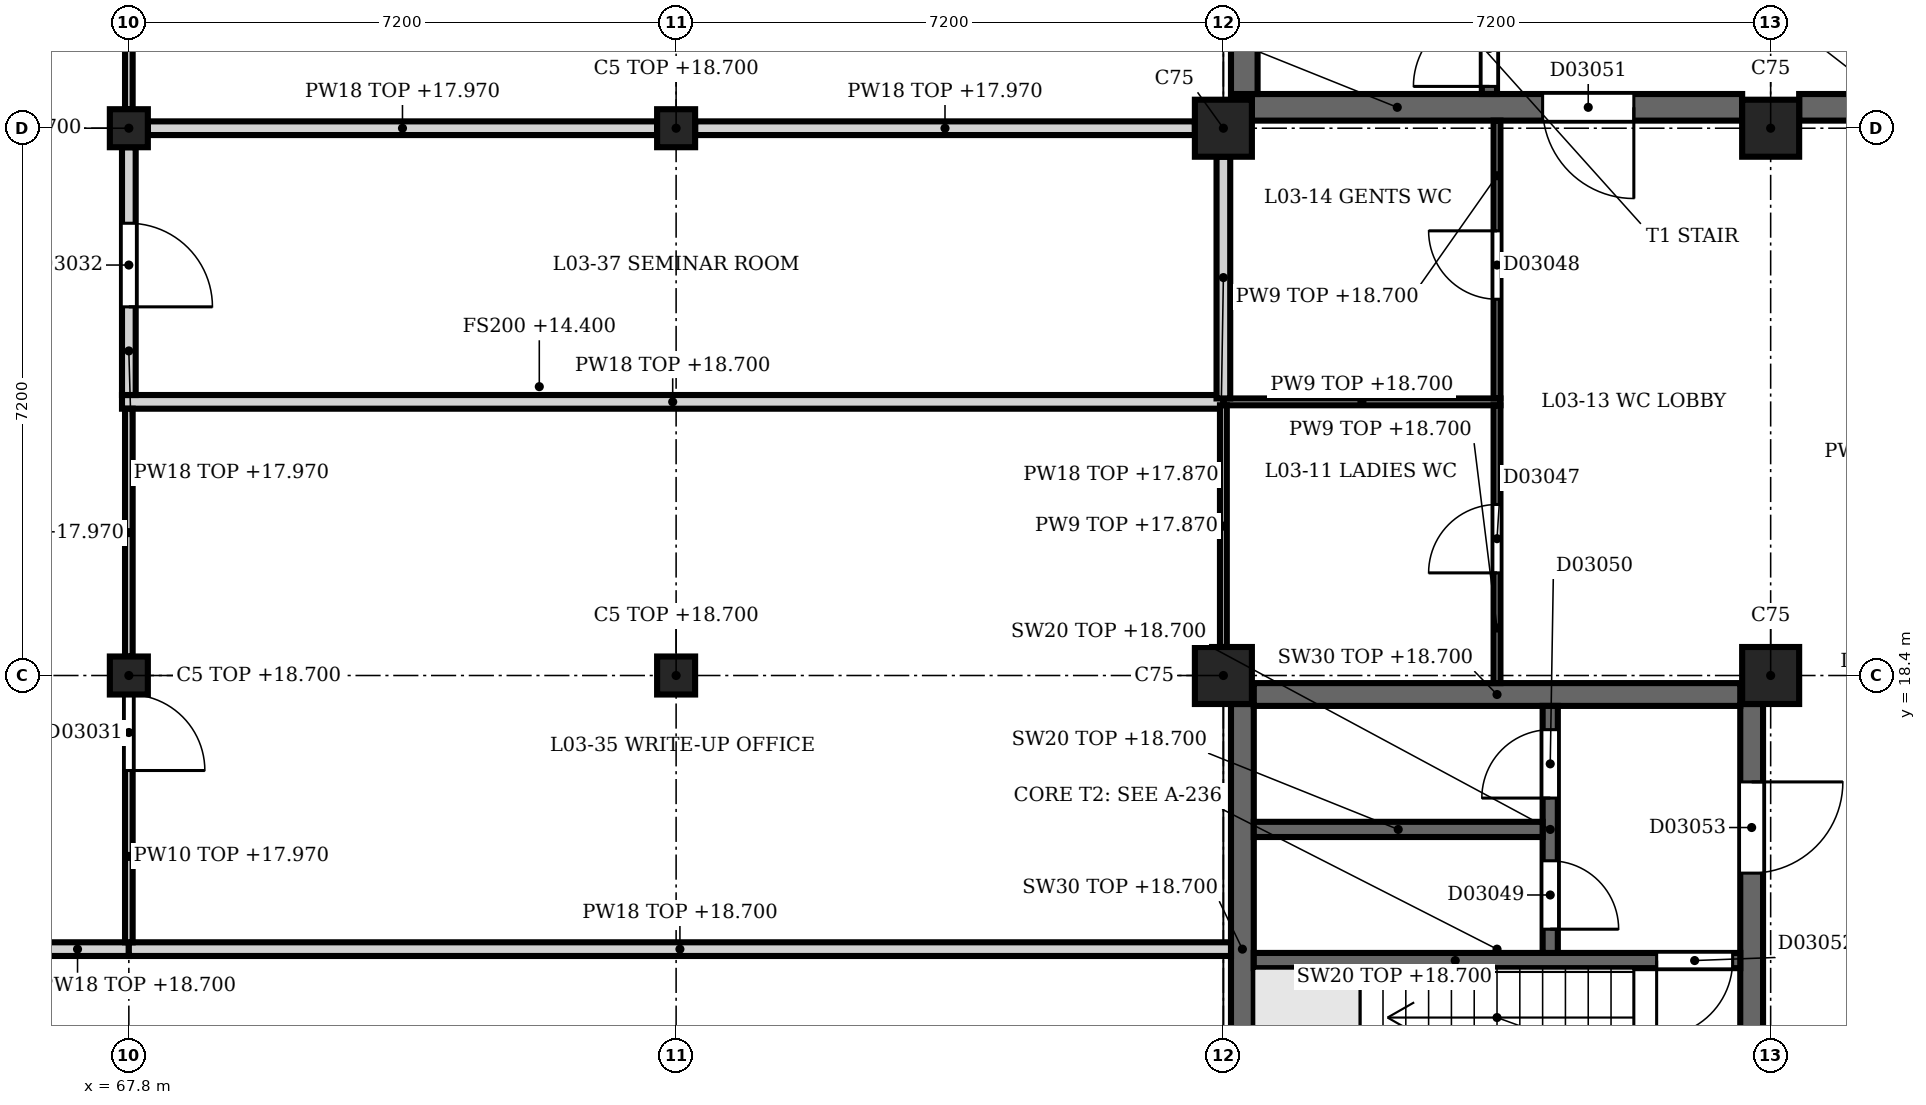
"""IFC4 building model, lengths in metres.
Left out: names, types, materials, properties, quantities, classifications, styles, units other than length and angle.
Written with IfcOpenShell. Run it as: python <this file> out.ifc"""

import sys

from ifc_helpers import new_model, si_unit, direction, frame, frame_2d, origin, origin_2d, place, context, subcontext, project, spatial, rectangle, extrude, element, fill, save


model = new_model("IFC4")
c1 = context("Model", 3, precision=1e-05, world=origin(), true_north=direction((0.0, 1.0)))
c2 = subcontext(c1, "Body", "Model", "MODEL_VIEW")
j1 = project(units=[si_unit("LENGTHUNIT", "METRE"), si_unit("PLANEANGLEUNIT", "RADIAN")], contexts=[c1])
p1 = place(None, origin())
s1 = spatial("IfcSite", under=j1, at=p1, CompositionType="ELEMENT")
p2 = place(p1, origin())
s2 = spatial("IfcBuilding", under=s1, at=p2, CompositionType="ELEMENT")
p3 = place(p2, frame((0.0, 0.0, 14.4)))
s3 = spatial("IfcBuildingStorey", under=s2, at=p3, CompositionType="ELEMENT", Elevation=14.4)
for number, where, z_axis, x_axis in (
    (1, (82.2, 18.4, 0.0), (0.0, 0.0, 1.0), (1.0, 0.0, 0.0)),
    (2, (82.2, 25.6, 0.0), (0.0, 0.0, 1.0), (1.0, 0.0, 0.0)),
    (3, (89.4, 18.4, 0.0), (0.0, 0.0, 1.0), (1.0, 0.0, 0.0)),
    (4, (89.4, 25.6, 0.0), (0.0, 0.0, 1.0), (1.0, 0.0, 0.0)),
):
    element("IfcColumn", number, at=place(p3, frame(where, z_axis=z_axis, x_axis=x_axis)), inside=s3, PredefinedType="COLUMN", context=c2, shape_type="SweptSolid", body=[
        extrude(rectangle(XDim=0.75, YDim=0.75, at=origin_2d()), origin(), (0.0, 0.0, 1.0), 4.5),
    ])
for number, where, z_axis, x_axis in (
    (5, (67.8, 18.4, 0.0), (0.0, 0.0, 1.0), (1.0, 0.0, 0.0)),
    (6, (67.8, 25.6, 0.0), (0.0, 0.0, 1.0), (1.0, 0.0, 0.0)),
    (7, (75.0, 18.4, 0.0), (0.0, 0.0, 1.0), (1.0, 0.0, 0.0)),
    (8, (75.0, 25.6, 0.0), (0.0, 0.0, 1.0), (1.0, 0.0, 0.0)),
):
    element("IfcColumn", number, at=place(p3, frame(where, z_axis=z_axis, x_axis=x_axis)), inside=s3, PredefinedType="COLUMN", context=c2, shape_type="SweptSolid", body=[
        extrude(rectangle(XDim=0.5, YDim=0.5, at=origin_2d()), origin(), (0.0, 0.0, 1.0), 4.3),
    ])
p4 = place(p3, frame((82.575, 25.875, 0.0), z_axis=(0.0, 0.0, 1.0), x_axis=(1.0, 0.0, 0.0)))
e9 = element("IfcWall", 9, at=p4, inside=s3, PredefinedType="SHEAR", context=c2, shape_type="SweptSolid", body=[
    extrude(rectangle(XDim=6.45, YDim=0.35, at=frame_2d((3.225, 0.0))), origin(), (0.0, 0.0, 1.0), 4.3),
])
p5 = place(p4, frame((3.825, 0.0, 0.0)))
e10 = element("IfcOpeningElement", 10, at=p5, cuts=e9, PredefinedType="OPENING", context=c2, shape_type="SweptSolid", body=[
    extrude(rectangle(XDim=1.2, YDim=2.1, at=frame_2d((0.6, 1.05))), frame((0.0, 0.185, 0.0), z_axis=(0.0, -1.0, 0.0), x_axis=(1.0, 0.0, 0.0)), (0.0, 0.0, 1.0), 0.37),
])
p6 = place(p3, frame((89.775, 25.875, 0.0), z_axis=(0.0, 0.0, 1.0), x_axis=(1.0, 0.0, 0.0)))
e11 = element("IfcWall", 11, at=p6, inside=s3, PredefinedType="SHEAR", context=c2, shape_type="SweptSolid", body=[
    extrude(rectangle(XDim=6.45, YDim=0.35, at=frame_2d((3.225, 0.0))), origin(), (0.0, 0.0, 1.0), 4.3),
])
p7 = place(p6, frame((2.625, 0.0, 0.0)))
e12 = element("IfcOpeningElement", 12, at=p7, cuts=e11, PredefinedType="OPENING", context=c2, shape_type="SweptSolid", body=[
    extrude(rectangle(XDim=1.8, YDim=2.1, at=frame_2d((0.9, 1.05))), frame((0.0, 0.185, 0.0), z_axis=(0.0, -1.0, 0.0), x_axis=(1.0, 0.0, 0.0)), (0.0, 0.0, 1.0), 0.37),
])
p8 = place(p3, frame((82.475, 26.05, 0.0), z_axis=(0.0, 0.0, 1.0), x_axis=(0.0, 1.0, 0.0)))
e13 = element("IfcWall", 13, at=p8, inside=s3, PredefinedType="SHEAR", context=c2, shape_type="SweptSolid", body=[
    extrude(rectangle(XDim=6.3, YDim=0.35, at=frame_2d((3.15, 0.0))), origin(), (0.0, 0.0, 1.0), 4.3),
])
p9 = place(p3, frame((85.7, 26.05, 0.0), z_axis=(0.0, 0.0, 1.0), x_axis=(0.0, 1.0, 0.0)))
e14 = element("IfcWall", 14, at=p9, inside=s3, PredefinedType="SHEAR", context=c2, shape_type="SweptSolid", body=[
    extrude(rectangle(XDim=6.3, YDim=0.2, at=frame_2d((3.15, 0.0))), origin(), (0.0, 0.0, 1.0), 4.3),
])
p10 = place(p9, frame((0.1, 0.0, 0.0)))
e15 = element("IfcOpeningElement", 15, at=p10, cuts=e14, PredefinedType="OPENING", context=c2, shape_type="SweptSolid", body=[
    extrude(rectangle(XDim=1.0, YDim=2.1, at=frame_2d((0.5, 1.05))), frame((0.0, 0.11, 0.0), z_axis=(0.0, -1.0, 0.0), x_axis=(1.0, 0.0, 0.0)), (0.0, 0.0, 1.0), 0.22),
])
p11 = place(p3, frame((89.15, 11.575, 0.0), z_axis=(0.0, 0.0, 1.0), x_axis=(0.0, 1.0, 0.0)))
e16 = element("IfcWall", 16, at=p11, inside=s3, PredefinedType="SHEAR", context=c2, shape_type="SweptSolid", body=[
    extrude(rectangle(XDim=6.45, YDim=0.3, at=frame_2d((3.225, 0.0))), origin(), (0.0, 0.0, 1.0), 4.3),
])
p12 = place(p11, frame((4.225, 0.0, 0.0)))
e17 = element("IfcOpeningElement", 17, at=p12, cuts=e16, PredefinedType="OPENING", context=c2, shape_type="SweptSolid", body=[
    extrude(rectangle(XDim=1.2, YDim=2.1, at=frame_2d((0.6, 1.05))), frame((0.0, 0.16, 0.0), z_axis=(0.0, -1.0, 0.0), x_axis=(1.0, 0.0, 0.0)), (0.0, 0.0, 1.0), 0.32),
])
p13 = place(p3, frame((82.45, 11.575, 0.0), z_axis=(0.0, 0.0, 1.0), x_axis=(0.0, 1.0, 0.0)))
e18 = element("IfcWall", 18, at=p13, inside=s3, PredefinedType="SHEAR", context=c2, shape_type="SweptSolid", body=[
    extrude(rectangle(XDim=6.45, YDim=0.3, at=frame_2d((3.225, 0.0))), origin(), (0.0, 0.0, 1.0), 4.3),
])
p14 = place(p3, frame((82.6, 18.15, 0.0), z_axis=(0.0, 0.0, 1.0), x_axis=(1.0, 0.0, 0.0)))
e19 = element("IfcWall", 19, at=p14, inside=s3, PredefinedType="SHEAR", context=c2, shape_type="SweptSolid", body=[
    extrude(rectangle(XDim=6.4, YDim=0.3, at=frame_2d((3.2, 0.0))), origin(), (0.0, 0.0, 1.0), 4.3),
])
p15 = place(p3, frame((89.0, 14.65, 0.0), z_axis=(0.0, 0.0, 1.0), x_axis=(-1.0, 0.0, 0.0)))
e20 = element("IfcWall", 20, at=p15, inside=s3, PredefinedType="SHEAR", context=c2, shape_type="SweptSolid", body=[
    extrude(rectangle(XDim=6.4, YDim=0.2, at=frame_2d((3.2, 0.0))), origin(), (0.0, 0.0, 1.0), 4.3),
])
p16 = place(p15, frame((0.1, 0.0, 0.0)))
e21 = element("IfcOpeningElement", 21, at=p16, cuts=e20, PredefinedType="OPENING", context=c2, shape_type="SweptSolid", body=[
    extrude(rectangle(XDim=1.0, YDim=2.1, at=frame_2d((0.5, 1.05))), frame((0.0, 0.11, 0.0), z_axis=(0.0, -1.0, 0.0), x_axis=(1.0, 0.0, 0.0)), (0.0, 0.0, 1.0), 0.22),
])
p17 = place(p3, frame((86.5, 18.0, 0.0), z_axis=(0.0, 0.0, 1.0), x_axis=(0.0, -1.0, 0.0)))
e22 = element("IfcWall", 22, at=p17, inside=s3, PredefinedType="SHEAR", context=c2, shape_type="SweptSolid", body=[
    extrude(rectangle(XDim=3.25, YDim=0.2, at=frame_2d((1.625, 0.0))), origin(), (0.0, 0.0, 1.0), 4.3),
])
p18 = place(p17, frame((2.038, 0.0, 0.0)))
e23 = element("IfcOpeningElement", 23, at=p18, cuts=e22, PredefinedType="OPENING", context=c2, shape_type="SweptSolid", body=[
    extrude(rectangle(XDim=0.9, YDim=2.1, at=frame_2d((0.45, 1.05))), frame((0.0, 0.11, 0.0), z_axis=(0.0, -1.0, 0.0), x_axis=(1.0, 0.0, 0.0)), (0.0, 0.0, 1.0), 0.22),
])
p19 = place(p17, frame((0.312, 0.0, 0.0)))
e24 = element("IfcOpeningElement", 24, at=p19, cuts=e22, PredefinedType="OPENING", context=c2, shape_type="SweptSolid", body=[
    extrude(rectangle(XDim=0.9, YDim=2.1, at=frame_2d((0.45, 1.05))), frame((0.0, 0.11, 0.0), z_axis=(0.0, -1.0, 0.0), x_axis=(1.0, 0.0, 0.0)), (0.0, 0.0, 1.0), 0.22),
])
p20 = place(p3, frame((82.6, 16.375, 0.0), z_axis=(0.0, 0.0, 1.0), x_axis=(1.0, 0.0, 0.0)))
e25 = element("IfcWall", 25, at=p20, inside=s3, PredefinedType="SHEAR", context=c2, shape_type="SweptSolid", body=[
    extrude(rectangle(XDim=3.8, YDim=0.2, at=frame_2d((1.9, 0.0))), origin(), (0.0, 0.0, 1.0), 4.3),
])
p21 = place(p3, frame((67.8, 14.8, 0.0), z_axis=(0.0, 0.0, 1.0), x_axis=(-1.0, 0.0, 0.0)))
e26 = element("IfcWall", 26, at=p21, inside=s3, PredefinedType="PARTITIONING", context=c2, shape_type="SweptSolid", body=[
    extrude(rectangle(XDim=3.6, YDim=0.18, at=frame_2d((1.8, 0.0))), origin(), (0.0, 0.0, 1.0), 4.3),
])
p22 = place(p21, frame((1.35, 0.0, 0.0)))
e27 = element("IfcOpeningElement", 27, at=p22, cuts=e26, PredefinedType="OPENING", context=c2, shape_type="SweptSolid", body=[
    extrude(rectangle(XDim=1.0, YDim=2.1, at=frame_2d((0.5, 1.05))), frame((0.0, 0.1, 0.0), z_axis=(0.0, -1.0, 0.0), x_axis=(1.0, 0.0, 0.0)), (0.0, 0.0, 1.0), 0.2),
])
p23 = place(p3, frame((67.8, 14.8, 0.0), z_axis=(0.0, 0.0, 1.0), x_axis=(1.0, 0.0, 0.0)))
e28 = element("IfcWall", 28, at=p23, inside=s3, PredefinedType="PARTITIONING", context=c2, shape_type="SweptSolid", body=[
    extrude(rectangle(XDim=14.5, YDim=0.18, at=frame_2d((7.25, 0.0))), origin(), (0.0, 0.0, 1.0), 4.3),
])
p24 = place(p3, frame((67.71, 22.0, 0.0), z_axis=(0.0, 0.0, 1.0), x_axis=(1.0, 0.0, 0.0)))
e29 = element("IfcWall", 29, at=p24, inside=s3, PredefinedType="PARTITIONING", context=c2, shape_type="SweptSolid", body=[
    extrude(rectangle(XDim=14.49, YDim=0.18, at=frame_2d((7.245, 0.0))), origin(), (0.0, 0.0, 1.0), 4.3),
])
p25 = place(p3, frame((82.2, 22.0, 0.0), z_axis=(0.0, 0.0, 1.0), x_axis=(1.0, 0.0, 0.0)))
e30 = element("IfcWall", 30, at=p25, inside=s3, PredefinedType="PARTITIONING", context=c2, shape_type="SweptSolid", body=[
    extrude(rectangle(XDim=3.645, YDim=0.09, at=frame_2d((1.823, 0.0))), origin(), (0.0, 0.0, 1.0), 4.3),
])
p26 = place(p3, frame((68.05, 25.6, 0.0), z_axis=(0.0, 0.0, 1.0), x_axis=(1.0, 0.0, 0.0)))
e31 = element("IfcWall", 31, at=p26, inside=s3, PredefinedType="PARTITIONING", context=c2, shape_type="SweptSolid", body=[
    extrude(rectangle(XDim=6.7, YDim=0.18, at=frame_2d((3.35, 0.0))), origin(), (0.0, 0.0, 1.0), 3.57),
])
p27 = place(p3, frame((75.25, 25.6, 0.0), z_axis=(0.0, 0.0, 1.0), x_axis=(1.0, 0.0, 0.0)))
e32 = element("IfcWall", 32, at=p27, inside=s3, PredefinedType="PARTITIONING", context=c2, shape_type="SweptSolid", body=[
    extrude(rectangle(XDim=6.575, YDim=0.18, at=frame_2d((3.288, 0.0))), origin(), (0.0, 0.0, 1.0), 3.57),
])
p28 = place(p3, frame((67.8, 18.15, 0.0), z_axis=(0.0, 0.0, 1.0), x_axis=(0.0, -1.0, 0.0)))
e33 = element("IfcWall", 33, at=p28, inside=s3, PredefinedType="PARTITIONING", context=c2, shape_type="SweptSolid", body=[
    extrude(rectangle(XDim=3.26, YDim=0.1, at=frame_2d((1.63, 0.0))), origin(), (0.0, 0.0, 1.0), 3.57),
])
p29 = place(p28, origin())
e34 = element("IfcOpeningElement", 34, at=p29, cuts=e33, PredefinedType="OPENING", context=c2, shape_type="SweptSolid", body=[
    extrude(rectangle(XDim=1.0, YDim=2.1, at=frame_2d((0.5, 1.05))), frame((0.0, 0.06, 0.0), z_axis=(0.0, -1.0, 0.0), x_axis=(1.0, 0.0, 0.0)), (0.0, 0.0, 1.0), 0.12),
])
p30 = place(p3, frame((67.8, 18.65, 0.0), z_axis=(0.0, 0.0, 1.0), x_axis=(0.0, 1.0, 0.0)))
e35 = element("IfcWall", 35, at=p30, inside=s3, PredefinedType="PARTITIONING", context=c2, shape_type="SweptSolid", body=[
    extrude(rectangle(XDim=3.26, YDim=0.1, at=frame_2d((1.63, 0.0))), origin(), (0.0, 0.0, 1.0), 3.57),
])
p31 = place(p3, frame((67.8, 25.35, 0.0), z_axis=(0.0, 0.0, 1.0), x_axis=(0.0, -1.0, 0.0)))
e36 = element("IfcWall", 36, at=p31, inside=s3, PredefinedType="PARTITIONING", context=c2, shape_type="SweptSolid", body=[
    extrude(rectangle(XDim=3.26, YDim=0.18, at=frame_2d((1.63, 0.0))), origin(), (0.0, 0.0, 1.0), 3.57),
])
p32 = place(p31, frame((1.0, 0.0, 0.0)))
e37 = element("IfcOpeningElement", 37, at=p32, cuts=e36, PredefinedType="OPENING", context=c2, shape_type="SweptSolid", body=[
    extrude(rectangle(XDim=1.1, YDim=2.3, at=frame_2d((0.55, 1.15))), frame((0.0, 0.1, 0.0), z_axis=(0.0, -1.0, 0.0), x_axis=(1.0, 0.0, 0.0)), (0.0, 0.0, 1.0), 0.2),
])
p33 = place(p3, frame((67.8, 25.85, 0.0), z_axis=(0.0, 0.0, 1.0), x_axis=(0.0, 1.0, 0.0)))
e38 = element("IfcWall", 38, at=p33, inside=s3, PredefinedType="PARTITIONING", context=c2, shape_type="SweptSolid", body=[
    extrude(rectangle(XDim=3.3, YDim=0.1, at=frame_2d((1.65, 0.0))), origin(), (0.0, 0.0, 1.0), 3.57),
])
p34 = place(p3, frame((82.2, 18.775, 0.0), z_axis=(0.0, 0.0, 1.0), x_axis=(0.0, 1.0, 0.0)))
e39 = element("IfcWall", 39, at=p34, inside=s3, PredefinedType="PARTITIONING", context=c2, shape_type="SweptSolid", body=[
    extrude(rectangle(XDim=3.18, YDim=0.09, at=frame_2d((1.59, 0.0))), origin(), (0.0, 0.0, 1.0), 3.47),
])
p35 = place(p3, frame((82.2, 22.045, 0.0), z_axis=(0.0, 0.0, 1.0), x_axis=(0.0, 1.0, 0.0)))
e40 = element("IfcWall", 40, at=p35, inside=s3, PredefinedType="PARTITIONING", context=c2, shape_type="SweptSolid", body=[
    extrude(rectangle(XDim=3.18, YDim=0.18, at=frame_2d((1.59, 0.0))), origin(), (0.0, 0.0, 1.0), 3.47),
])
p36 = place(p3, frame((85.8, 18.3, 0.0), z_axis=(0.0, 0.0, 1.0), x_axis=(0.0, 1.0, 0.0)))
e41 = element("IfcWall", 41, at=p36, inside=s3, PredefinedType="PARTITIONING", context=c2, shape_type="SweptSolid", body=[
    extrude(rectangle(XDim=3.655, YDim=0.09, at=frame_2d((1.828, 0.0))), origin(), (0.0, 0.0, 1.0), 4.3),
])
p37 = place(p36, frame((1.45, 0.0, 0.0)))
e42 = element("IfcOpeningElement", 42, at=p37, cuts=e41, PredefinedType="OPENING", context=c2, shape_type="SweptSolid", body=[
    extrude(rectangle(XDim=0.9, YDim=2.1, at=frame_2d((0.45, 1.05))), frame((0.0, 0.055, 0.0), z_axis=(0.0, -1.0, 0.0), x_axis=(1.0, 0.0, 0.0)), (0.0, 0.0, 1.0), 0.11),
])
p38 = place(p3, frame((85.8, 22.045, 0.0), z_axis=(0.0, 0.0, 1.0), x_axis=(0.0, 1.0, 0.0)))
e43 = element("IfcWall", 43, at=p38, inside=s3, PredefinedType="PARTITIONING", context=c2, shape_type="SweptSolid", body=[
    extrude(rectangle(XDim=3.655, YDim=0.09, at=frame_2d((1.828, 0.0))), origin(), (0.0, 0.0, 1.0), 4.3),
])
p39 = place(p38, frame((1.305, 0.0, 0.0)))
e44 = element("IfcOpeningElement", 44, at=p39, cuts=e43, PredefinedType="OPENING", context=c2, shape_type="SweptSolid", body=[
    extrude(rectangle(XDim=0.9, YDim=2.1, at=frame_2d((0.45, 1.05))), frame((0.0, 0.055, 0.0), z_axis=(0.0, -1.0, 0.0), x_axis=(1.0, 0.0, 0.0)), (0.0, 0.0, 1.0), 0.11),
])
p40 = place(p5, origin())
e45 = element("IfcDoor", 45, at=p40, inside=s3, OperationType="SINGLE_SWING_RIGHT", PredefinedType="DOOR", context=c2, shape_type="SweptSolid", body=[
    extrude(rectangle(XDim=1.2, YDim=2.1, at=frame_2d((0.6, 1.05))), frame((0.0, 0.025, 0.0), z_axis=(0.0, -1.0, 0.0), x_axis=(1.0, 0.0, 0.0)), (0.0, 0.0, 1.0), 0.05),
])
fill(e10, e45)
p41 = place(p10, origin())
e46 = element("IfcDoor", 46, at=p41, inside=s3, OperationType="SINGLE_SWING_LEFT", PredefinedType="DOOR", context=c2, shape_type="SweptSolid", body=[
    extrude(rectangle(XDim=1.0, YDim=2.1, at=frame_2d((0.5, 1.05))), frame((0.0, 0.025, 0.0), z_axis=(0.0, -1.0, 0.0), x_axis=(1.0, 0.0, 0.0)), (0.0, 0.0, 1.0), 0.05),
])
fill(e15, e46)
p42 = place(p12, origin())
e47 = element("IfcDoor", 47, at=p42, inside=s3, OperationType="SINGLE_SWING_RIGHT", PredefinedType="DOOR", context=c2, shape_type="SweptSolid", body=[
    extrude(rectangle(XDim=1.2, YDim=2.1, at=frame_2d((0.6, 1.05))), frame((0.0, 0.025, 0.0), z_axis=(0.0, -1.0, 0.0), x_axis=(1.0, 0.0, 0.0)), (0.0, 0.0, 1.0), 0.05),
])
fill(e17, e47)
p43 = place(p18, origin())
e48 = element("IfcDoor", 48, at=p43, inside=s3, OperationType="SINGLE_SWING_RIGHT", PredefinedType="DOOR", context=c2, shape_type="SweptSolid", body=[
    extrude(rectangle(XDim=0.9, YDim=2.1, at=frame_2d((0.45, 1.05))), frame((0.0, 0.025, 0.0), z_axis=(0.0, -1.0, 0.0), x_axis=(1.0, 0.0, 0.0)), (0.0, 0.0, 1.0), 0.05),
])
fill(e23, e48)
p44 = place(p19, origin())
e49 = element("IfcDoor", 49, at=p44, inside=s3, OperationType="SINGLE_SWING_LEFT", PredefinedType="DOOR", context=c2, shape_type="SweptSolid", body=[
    extrude(rectangle(XDim=0.9, YDim=2.1, at=frame_2d((0.45, 1.05))), frame((0.0, 0.025, 0.0), z_axis=(0.0, -1.0, 0.0), x_axis=(1.0, 0.0, 0.0)), (0.0, 0.0, 1.0), 0.05),
])
fill(e24, e49)
p45 = place(p16, origin())
e50 = element("IfcDoor", 50, at=p45, inside=s3, OperationType="SINGLE_SWING_LEFT", PredefinedType="DOOR", context=c2, shape_type="SweptSolid", body=[
    extrude(rectangle(XDim=1.0, YDim=2.1, at=frame_2d((0.5, 1.05))), frame((0.0, 0.025, 0.0), z_axis=(0.0, -1.0, 0.0), x_axis=(1.0, 0.0, 0.0)), (0.0, 0.0, 1.0), 0.05),
])
fill(e21, e50)
p46 = place(p29, origin())
e51 = element("IfcDoor", 51, at=p46, inside=s3, OperationType="SINGLE_SWING_LEFT", PredefinedType="DOOR", context=c2, shape_type="SweptSolid", body=[
    extrude(rectangle(XDim=1.0, YDim=2.1, at=frame_2d((0.5, 1.05))), frame((0.0, 0.025, 0.0), z_axis=(0.0, -1.0, 0.0), x_axis=(1.0, 0.0, 0.0)), (0.0, 0.0, 1.0), 0.05),
])
fill(e34, e51)
p47 = place(p32, origin())
e52 = element("IfcDoor", 52, at=p47, inside=s3, OperationType="SINGLE_SWING_LEFT", PredefinedType="DOOR", context=c2, shape_type="SweptSolid", body=[
    extrude(rectangle(XDim=1.1, YDim=2.3, at=frame_2d((0.55, 1.15))), frame((0.0, 0.025, 0.0), z_axis=(0.0, -1.0, 0.0), x_axis=(1.0, 0.0, 0.0)), (0.0, 0.0, 1.0), 0.05),
])
fill(e37, e52)
p48 = place(p37, origin())
e53 = element("IfcDoor", 53, at=p48, inside=s3, OperationType="SINGLE_SWING_RIGHT", PredefinedType="DOOR", context=c2, shape_type="SweptSolid", body=[
    extrude(rectangle(XDim=0.9, YDim=2.1, at=frame_2d((0.45, 1.05))), frame((0.0, 0.025, 0.0), z_axis=(0.0, -1.0, 0.0), x_axis=(1.0, 0.0, 0.0)), (0.0, 0.0, 1.0), 0.05),
])
fill(e42, e53)
p49 = place(p39, origin())
e54 = element("IfcDoor", 54, at=p49, inside=s3, OperationType="SINGLE_SWING_LEFT", PredefinedType="DOOR", context=c2, shape_type="SweptSolid", body=[
    extrude(rectangle(XDim=0.9, YDim=2.1, at=frame_2d((0.45, 1.05))), frame((0.0, 0.025, 0.0), z_axis=(0.0, -1.0, 0.0), x_axis=(1.0, 0.0, 0.0)), (0.0, 0.0, 1.0), 0.05),
])
fill(e44, e54)
save(model, sys.argv[1])
